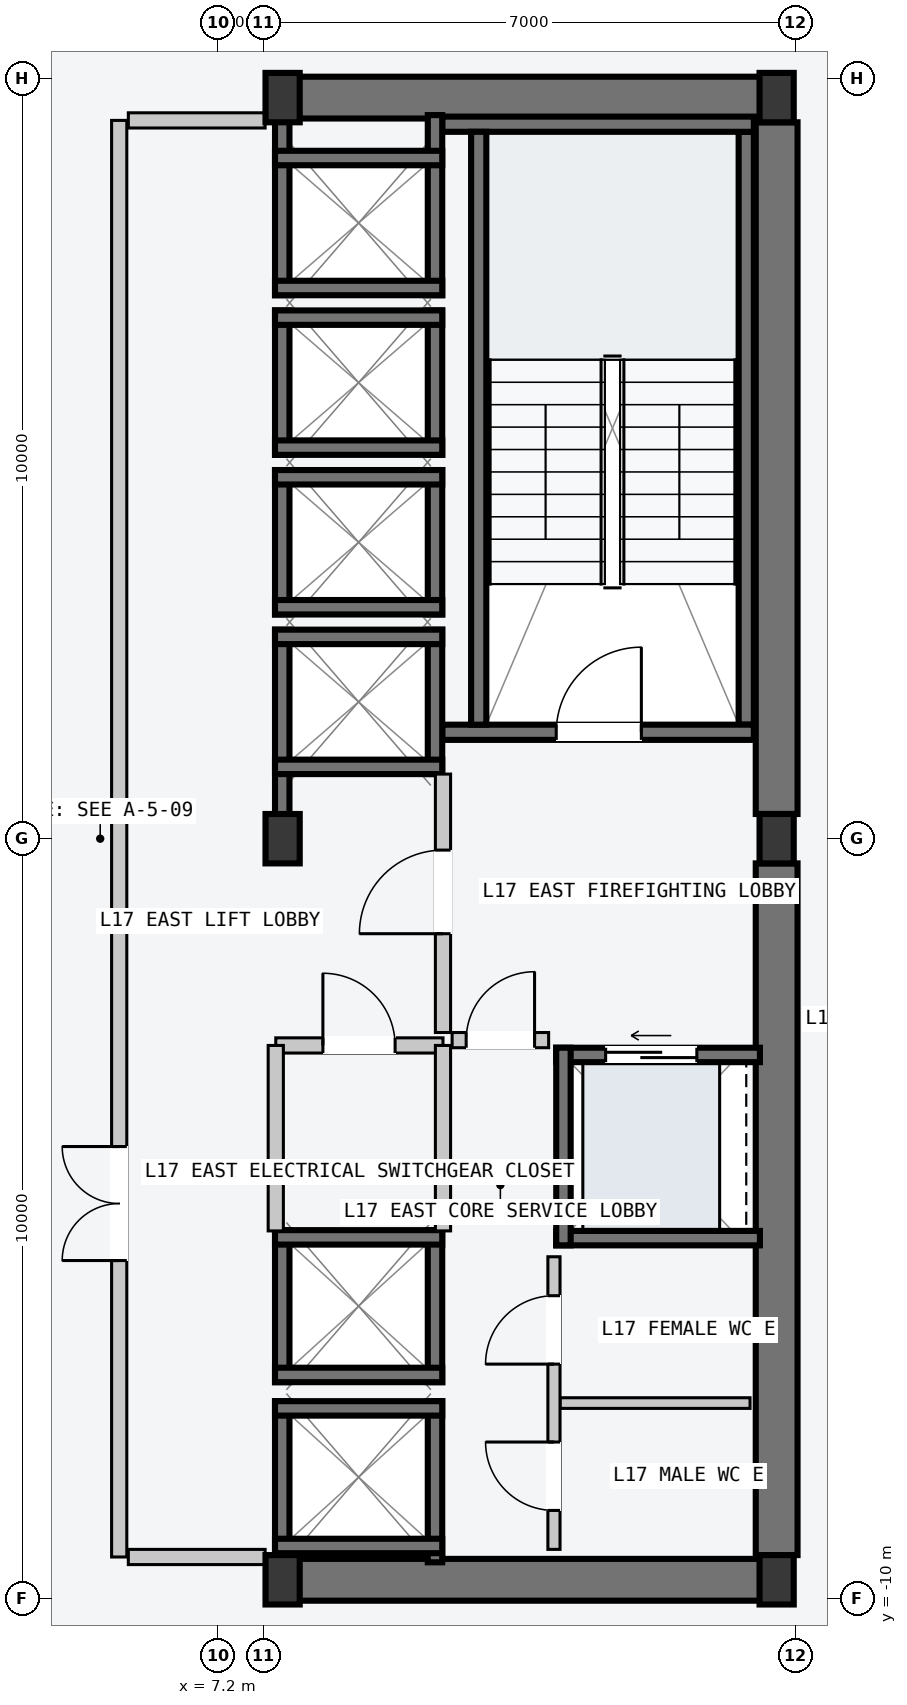
"""IFC4 building model, lengths in metres.
Left out: names, types, materials, properties, quantities, classifications, styles, units other than length and angle.
Written with IfcOpenShell. Run it as: python <this file> out.ifc"""

import sys

from ifc_helpers import new_model, si_unit, direction, frame, frame_2d, origin, origin_2d, place, context, subcontext, project, spatial, rectangle, i_section, extrude, element, fill, save


model = new_model("IFC4")
c1 = context("Model", 3, precision=1e-05, world=origin(), true_north=direction((0.0, 1.0)))
c2 = subcontext(c1, "Body", "Model", "MODEL_VIEW")
j1 = project(units=[si_unit("LENGTHUNIT", "METRE"), si_unit("PLANEANGLEUNIT", "RADIAN")], contexts=[c1])
p1 = place(None, origin())
s1 = spatial("IfcSite", under=j1, at=p1, CompositionType="ELEMENT")
p2 = place(p1, origin())
s2 = spatial("IfcBuilding", under=s1, at=p2, CompositionType="ELEMENT")
p3 = place(p2, frame((0.0, 0.0, 67.2)))
s3 = spatial("IfcBuildingStorey", under=s2, at=p3, CompositionType="ELEMENT", Elevation=67.2)
for number, where, z_axis, x_axis in (
    (1, (8.07, -9.75, -0.2), (0.0, 0.0, 1.0), (1.0, 0.0, 0.0)),
    (2, (8.07, 9.75, -0.2), (0.0, 0.0, 1.0), (1.0, 0.0, 0.0)),
):
    element("IfcWall", number, at=place(p3, frame(where, z_axis=z_axis, x_axis=x_axis)), inside=s3, PredefinedType="SHEAR", context=c2, shape_type="SweptSolid", body=[
        extrude(rectangle(XDim=6.46, YDim=0.55, at=frame_2d((3.23, 0.0))), origin(), (0.0, 0.0, 1.0), 3.6),
    ])
for number, where, z_axis, x_axis in (
    (3, (14.55, -9.425, -0.2), (0.0, 0.0, 1.0), (0.0, 1.0, 0.0)),
    (4, (14.55, 0.325, -0.2), (0.0, 0.0, 1.0), (0.0, 1.0, 0.0)),
):
    element("IfcWall", number, at=place(p3, frame(where, z_axis=z_axis, x_axis=x_axis)), inside=s3, PredefinedType="SHEAR", context=c2, shape_type="SweptSolid", body=[
        extrude(rectangle(XDim=9.1, YDim=0.55, at=frame_2d((4.55, 0.0))), origin(), (0.0, 0.0, 1.0), 3.6),
    ])
p4 = place(p3, frame((14.15, 1.5, -0.2), z_axis=(0.0, 0.0, 1.0), x_axis=(0.0, 1.0, 0.0)))
e5 = element("IfcWall", 5, at=p4, inside=s3, PredefinedType="SOLIDWALL", context=c2, shape_type="SweptSolid", body=[
    extrude(rectangle(XDim=7.8, YDim=0.2, at=frame_2d((3.9, 0.0))), origin(), (0.0, 0.0, 1.0), 3.6),
])
p5 = place(p3, frame((10.15, 1.4, -0.2), z_axis=(0.0, 0.0, 1.0), x_axis=(1.0, 0.0, 0.0)))
e6 = element("IfcWall", 6, at=p5, inside=s3, PredefinedType="SOLIDWALL", context=c2, shape_type="SweptSolid", body=[
    extrude(rectangle(XDim=4.1, YDim=0.2, at=frame_2d((2.05, 0.0))), origin(), (0.0, 0.0, 1.0), 3.6),
])
p6 = place(p5, frame((1.5, 0.0, 0.2)))
e7 = element("IfcOpeningElement", 7, at=p6, cuts=e6, PredefinedType="OPENING", context=c2, shape_type="SweptSolid", body=[
    extrude(rectangle(XDim=1.12, YDim=2.18, at=frame_2d((0.56, 1.09))), frame((0.0, 0.11, 0.0), z_axis=(0.0, -1.0, 0.0), x_axis=(1.0, 0.0, 0.0)), (0.0, 0.0, 1.0), 0.22),
])
p7 = place(p3, frame((10.15, 9.4, -0.2), z_axis=(0.0, 0.0, 1.0), x_axis=(1.0, 0.0, 0.0)))
e8 = element("IfcWall", 8, at=p7, inside=s3, PredefinedType="SOLIDWALL", context=c2, shape_type="SweptSolid", body=[
    extrude(rectangle(XDim=4.1, YDim=0.2, at=frame_2d((2.05, 0.0))), origin(), (0.0, 0.0, 1.0), 3.6),
])
p8 = place(p3, frame((10.63, 1.5, -0.2), z_axis=(0.0, 0.0, 1.0), x_axis=(0.0, 1.0, 0.0)))
e9 = element("IfcWall", 9, at=p8, inside=s3, PredefinedType="SOLIDWALL", context=c2, shape_type="SweptSolid", body=[
    extrude(rectangle(XDim=7.8, YDim=0.2, at=frame_2d((3.9, 0.0))), origin(), (0.0, 0.0, 1.0), 3.6),
])
for number, where, z_axis, x_axis in (
    (10, (8.05, -9.75, 0.0), (0.0, 0.0, 1.0), (1.0, 0.0, 0.0)),
    (11, (8.05, 0.0, 0.0), (0.0, 0.0, 1.0), (1.0, 0.0, 0.0)),
    (12, (8.05, 9.75, 0.0), (0.0, 0.0, 1.0), (1.0, 0.0, 0.0)),
    (13, (14.55, -9.75, 0.0), (0.0, 0.0, 1.0), (1.0, 0.0, 0.0)),
    (14, (14.55, 0.0, 0.0), (0.0, 0.0, 1.0), (1.0, 0.0, 0.0)),
    (15, (14.55, 9.75, 0.0), (0.0, 0.0, 1.0), (1.0, 0.0, 0.0)),
):
    element("IfcColumn", number, at=place(p3, frame(where, z_axis=z_axis, x_axis=x_axis)), inside=s3, PredefinedType="COLUMN", context=c2, shape_type="SweptSolid", body=[
        extrude(i_section(OverallWidth=0.45, OverallDepth=0.65, WebThickness=0.025, FlangeThickness=0.04, at=origin_2d()), origin(), (0.0, 0.0, 1.0), 3.6),
    ])
p9 = place(p3, frame((8.045, 0.21, -0.2), z_axis=(0.0, 0.0, 1.0), x_axis=(0.0, 1.0, 0.0)))
e16 = element("IfcWall", 16, at=p9, inside=s3, PredefinedType="SOLIDWALL", context=c2, shape_type="SweptSolid", body=[
    extrude(rectangle(XDim=2.54, YDim=0.19, at=frame_2d((1.27, 0.0))), origin(), (0.0, 0.0, 1.0), 3.6),
])
p10 = place(p3, frame((10.055, 0.85, -0.2), z_axis=(0.0, 0.0, 1.0), x_axis=(0.0, 1.0, 0.0)))
e17 = element("IfcWall", 17, at=p10, inside=s3, PredefinedType="SOLIDWALL", context=c2, shape_type="SweptSolid", body=[
    extrude(rectangle(XDim=1.9, YDim=0.19, at=frame_2d((0.95, 0.0))), origin(), (0.0, 0.0, 1.0), 3.6),
])
for number, where, z_axis, x_axis in (
    (18, (7.95, 2.655, -0.2), (0.0, 0.0, 1.0), (1.0, 0.0, 0.0)),
    (19, (7.95, 0.945, -0.2), (0.0, 0.0, 1.0), (1.0, 0.0, 0.0)),
):
    element("IfcWall", number, at=place(p3, frame(where, z_axis=z_axis, x_axis=x_axis)), inside=s3, PredefinedType="SOLIDWALL", context=c2, shape_type="SweptSolid", body=[
        extrude(rectangle(XDim=2.2, YDim=0.19, at=frame_2d((1.1, 0.0))), origin(), (0.0, 0.0, 1.0), 3.6),
    ])
for number, where, z_axis, x_axis in (
    (20, (8.045, 2.95, -0.2), (0.0, 0.0, 1.0), (0.0, 1.0, 0.0)),
    (21, (10.055, 2.95, -0.2), (0.0, 0.0, 1.0), (0.0, 1.0, 0.0)),
):
    element("IfcWall", number, at=place(p3, frame(where, z_axis=z_axis, x_axis=x_axis)), inside=s3, PredefinedType="SOLIDWALL", context=c2, shape_type="SweptSolid", body=[
        extrude(rectangle(XDim=1.9, YDim=0.19, at=frame_2d((0.95, 0.0))), origin(), (0.0, 0.0, 1.0), 3.6),
    ])
for number, where, z_axis, x_axis in (
    (22, (7.95, 4.755, -0.2), (0.0, 0.0, 1.0), (1.0, 0.0, 0.0)),
    (23, (7.95, 3.045, -0.2), (0.0, 0.0, 1.0), (1.0, 0.0, 0.0)),
):
    element("IfcWall", number, at=place(p3, frame(where, z_axis=z_axis, x_axis=x_axis)), inside=s3, PredefinedType="SOLIDWALL", context=c2, shape_type="SweptSolid", body=[
        extrude(rectangle(XDim=2.2, YDim=0.19, at=frame_2d((1.1, 0.0))), origin(), (0.0, 0.0, 1.0), 3.6),
    ])
for number, where, z_axis, x_axis in (
    (24, (8.045, 5.05, -0.2), (0.0, 0.0, 1.0), (0.0, 1.0, 0.0)),
    (25, (10.055, 5.05, -0.2), (0.0, 0.0, 1.0), (0.0, 1.0, 0.0)),
):
    element("IfcWall", number, at=place(p3, frame(where, z_axis=z_axis, x_axis=x_axis)), inside=s3, PredefinedType="SOLIDWALL", context=c2, shape_type="SweptSolid", body=[
        extrude(rectangle(XDim=1.9, YDim=0.19, at=frame_2d((0.95, 0.0))), origin(), (0.0, 0.0, 1.0), 3.6),
    ])
for number, where, z_axis, x_axis in (
    (26, (7.95, 6.855, -0.2), (0.0, 0.0, 1.0), (1.0, 0.0, 0.0)),
    (27, (7.95, 5.145, -0.2), (0.0, 0.0, 1.0), (1.0, 0.0, 0.0)),
):
    element("IfcWall", number, at=place(p3, frame(where, z_axis=z_axis, x_axis=x_axis)), inside=s3, PredefinedType="SOLIDWALL", context=c2, shape_type="SweptSolid", body=[
        extrude(rectangle(XDim=2.2, YDim=0.19, at=frame_2d((1.1, 0.0))), origin(), (0.0, 0.0, 1.0), 3.6),
    ])
for number, where, z_axis, x_axis in (
    (28, (8.045, 7.15, -0.2), (0.0, 0.0, 1.0), (0.0, 1.0, 0.0)),
    (29, (10.055, 7.15, -0.2), (0.0, 0.0, 1.0), (0.0, 1.0, 0.0)),
):
    element("IfcWall", number, at=place(p3, frame(where, z_axis=z_axis, x_axis=x_axis)), inside=s3, PredefinedType="SOLIDWALL", context=c2, shape_type="SweptSolid", body=[
        extrude(rectangle(XDim=2.37, YDim=0.19, at=frame_2d((1.185, 0.0))), origin(), (0.0, 0.0, 1.0), 3.6),
    ])
for number, where, z_axis, x_axis in (
    (30, (7.95, 8.955, -0.2), (0.0, 0.0, 1.0), (1.0, 0.0, 0.0)),
    (31, (7.95, 7.245, -0.2), (0.0, 0.0, 1.0), (1.0, 0.0, 0.0)),
):
    element("IfcWall", number, at=place(p3, frame(where, z_axis=z_axis, x_axis=x_axis)), inside=s3, PredefinedType="SOLIDWALL", context=c2, shape_type="SweptSolid", body=[
        extrude(rectangle(XDim=2.2, YDim=0.19, at=frame_2d((1.1, 0.0))), origin(), (0.0, 0.0, 1.0), 3.6),
    ])
for number, where, z_axis, x_axis in (
    (32, (8.045, -9.52, -0.2), (0.0, 0.0, 1.0), (0.0, 1.0, 0.0)),
    (33, (10.055, -9.52, -0.2), (0.0, 0.0, 1.0), (0.0, 1.0, 0.0)),
):
    element("IfcWall", number, at=place(p3, frame(where, z_axis=z_axis, x_axis=x_axis)), inside=s3, PredefinedType="SOLIDWALL", context=c2, shape_type="SweptSolid", body=[
        extrude(rectangle(XDim=2.12, YDim=0.19, at=frame_2d((1.06, 0.0))), origin(), (0.0, 0.0, 1.0), 3.6),
    ])
for number, where, z_axis, x_axis in (
    (34, (7.95, -7.495, -0.2), (0.0, 0.0, 1.0), (1.0, 0.0, 0.0)),
    (35, (7.95, -9.305, -0.2), (0.0, 0.0, 1.0), (1.0, 0.0, 0.0)),
):
    element("IfcWall", number, at=place(p3, frame(where, z_axis=z_axis, x_axis=x_axis)), inside=s3, PredefinedType="SOLIDWALL", context=c2, shape_type="SweptSolid", body=[
        extrude(rectangle(XDim=2.2, YDim=0.19, at=frame_2d((1.1, 0.0))), origin(), (0.0, 0.0, 1.0), 3.6),
    ])
for number, where, z_axis, x_axis in (
    (36, (8.045, -7.15, -0.2), (0.0, 0.0, 1.0), (0.0, 1.0, 0.0)),
    (37, (10.055, -7.15, -0.2), (0.0, 0.0, 1.0), (0.0, 1.0, 0.0)),
):
    element("IfcWall", number, at=place(p3, frame(where, z_axis=z_axis, x_axis=x_axis)), inside=s3, PredefinedType="SOLIDWALL", context=c2, shape_type="SweptSolid", body=[
        extrude(rectangle(XDim=2.0, YDim=0.19, at=frame_2d((1.0, 0.0))), origin(), (0.0, 0.0, 1.0), 3.6),
    ])
for number, where, z_axis, x_axis in (
    (38, (7.95, -5.245, -0.2), (0.0, 0.0, 1.0), (1.0, 0.0, 0.0)),
    (39, (7.95, -7.055, -0.2), (0.0, 0.0, 1.0), (1.0, 0.0, 0.0)),
):
    element("IfcWall", number, at=place(p3, frame(where, z_axis=z_axis, x_axis=x_axis)), inside=s3, PredefinedType="SOLIDWALL", context=c2, shape_type="SweptSolid", body=[
        extrude(rectangle(XDim=2.2, YDim=0.19, at=frame_2d((1.1, 0.0))), origin(), (0.0, 0.0, 1.0), 3.6),
    ])
p11 = place(p3, frame((11.65, -2.845, -0.2), z_axis=(0.0, 0.0, 1.0), x_axis=(1.0, 0.0, 0.0)))
e40 = element("IfcWall", 40, at=p11, inside=s3, PredefinedType="SOLIDWALL", context=c2, shape_type="SweptSolid", body=[
    extrude(rectangle(XDim=2.68, YDim=0.19, at=frame_2d((1.34, 0.0))), origin(), (0.0, 0.0, 1.0), 3.6),
])
p12 = place(p11, frame((0.65, 0.0, 0.2)))
e41 = element("IfcOpeningElement", 41, at=p12, cuts=e40, PredefinedType="OPENING", context=c2, shape_type="SweptSolid", body=[
    extrude(rectangle(XDim=1.2, YDim=2.2, at=frame_2d((0.6, 1.1))), frame((0.0, 0.105, 0.0), z_axis=(0.0, -1.0, 0.0), x_axis=(1.0, 0.0, 0.0)), (0.0, 0.0, 1.0), 0.21),
])
p13 = place(p3, frame((11.65, -5.255, -0.2), z_axis=(0.0, 0.0, 1.0), x_axis=(1.0, 0.0, 0.0)))
e42 = element("IfcWall", 42, at=p13, inside=s3, PredefinedType="SOLIDWALL", context=c2, shape_type="SweptSolid", body=[
    extrude(rectangle(XDim=2.68, YDim=0.19, at=frame_2d((1.34, 0.0))), origin(), (0.0, 0.0, 1.0), 3.6),
])
p14 = place(p3, frame((11.745, -5.35, -0.2), z_axis=(0.0, 0.0, 1.0), x_axis=(0.0, 1.0, 0.0)))
e43 = element("IfcWall", 43, at=p14, inside=s3, PredefinedType="SOLIDWALL", context=c2, shape_type="SweptSolid", body=[
    extrude(rectangle(XDim=2.6, YDim=0.19, at=frame_2d((1.3, 0.0))), origin(), (0.0, 0.0, 1.0), 3.6),
])
p15 = place(p3, frame((5.9, -9.45, 0.0), z_axis=(0.0, 0.0, 1.0), x_axis=(0.0, 1.0, 0.0)))
e44 = element("IfcWall", 44, at=p15, inside=s3, PredefinedType="PARTITIONING", context=c2, shape_type="SweptSolid", body=[
    extrude(rectangle(XDim=18.9, YDim=0.2, at=frame_2d((9.45, 0.0))), origin(), (0.0, 0.0, 1.0), 3.4),
])
p16 = place(p15, frame((3.9, 0.0, 0.0)))
e45 = element("IfcOpeningElement", 45, at=p16, cuts=e44, PredefinedType="OPENING", context=c2, shape_type="SweptSolid", body=[
    extrude(rectangle(XDim=1.5, YDim=2.2, at=frame_2d((0.75, 1.1))), frame((0.0, 0.11, 0.0), z_axis=(0.0, -1.0, 0.0), x_axis=(1.0, 0.0, 0.0)), (0.0, 0.0, 1.0), 0.22),
])
for number, where, z_axis, x_axis in (
    (46, (6.02, -9.45, 0.0), (0.0, 0.0, 1.0), (1.0, 0.0, 0.0)),
    (47, (6.02, 9.45, 0.0), (0.0, 0.0, 1.0), (1.0, 0.0, 0.0)),
):
    element("IfcWall", number, at=place(p3, frame(where, z_axis=z_axis, x_axis=x_axis)), inside=s3, PredefinedType="PARTITIONING", context=c2, shape_type="SweptSolid", body=[
        extrude(rectangle(XDim=1.8, YDim=0.2, at=frame_2d((0.9, 0.0))), origin(), (0.0, 0.0, 1.0), 3.4),
    ])
p17 = place(p3, frame((10.16, -2.55, 0.0), z_axis=(0.0, 0.0, 1.0), x_axis=(0.0, 1.0, 0.0)))
e48 = element("IfcWall", 48, at=p17, inside=s3, PredefinedType="PARTITIONING", context=c2, shape_type="SweptSolid", body=[
    extrude(rectangle(XDim=3.4, YDim=0.2, at=frame_2d((1.7, 0.0))), origin(), (0.0, 0.0, 1.0), 3.4),
])
p18 = place(p17, frame((1.3, 0.0, 0.0)))
e49 = element("IfcOpeningElement", 49, at=p18, cuts=e48, PredefinedType="OPENING", context=c2, shape_type="SweptSolid", body=[
    extrude(rectangle(XDim=1.1, YDim=2.15, at=frame_2d((0.55, 1.075))), frame((0.0, 0.11, 0.0), z_axis=(0.0, -1.0, 0.0), x_axis=(1.0, 0.0, 0.0)), (0.0, 0.0, 1.0), 0.22),
])
p19 = place(p3, frame((10.28, -2.65, 0.0), z_axis=(0.0, 0.0, 1.0), x_axis=(1.0, 0.0, 0.0)))
e50 = element("IfcWall", 50, at=p19, inside=s3, PredefinedType="PARTITIONING", context=c2, shape_type="SweptSolid", body=[
    extrude(rectangle(XDim=1.27, YDim=0.2, at=frame_2d((0.635, 0.0))), origin(), (0.0, 0.0, 1.0), 3.4),
])
p20 = place(p19, frame((0.185, 0.0, 0.0)))
e51 = element("IfcOpeningElement", 51, at=p20, cuts=e50, PredefinedType="OPENING", context=c2, shape_type="SweptSolid", body=[
    extrude(rectangle(XDim=0.9, YDim=2.15, at=frame_2d((0.45, 1.075))), frame((0.0, 0.11, 0.0), z_axis=(0.0, -1.0, 0.0), x_axis=(1.0, 0.0, 0.0)), (0.0, 0.0, 1.0), 0.22),
])
p21 = place(p3, frame((7.96, -2.72, 0.0), z_axis=(0.0, 0.0, 1.0), x_axis=(1.0, 0.0, 0.0)))
e52 = element("IfcWall", 52, at=p21, inside=s3, PredefinedType="PARTITIONING", context=c2, shape_type="SweptSolid", body=[
    extrude(rectangle(XDim=2.2, YDim=0.2, at=frame_2d((1.1, 0.0))), origin(), (0.0, 0.0, 1.0), 3.4),
])
p22 = place(p21, frame((0.62, 0.0, 0.0)))
e53 = element("IfcOpeningElement", 53, at=p22, cuts=e52, PredefinedType="OPENING", context=c2, shape_type="SweptSolid", body=[
    extrude(rectangle(XDim=0.95, YDim=2.1, at=frame_2d((0.475, 1.05))), frame((0.0, 0.11, 0.0), z_axis=(0.0, -1.0, 0.0), x_axis=(1.0, 0.0, 0.0)), (0.0, 0.0, 1.0), 0.22),
])
for number, where, z_axis, x_axis in (
    (54, (7.96, -5.16, 0.0), (0.0, 0.0, 1.0), (0.0, 1.0, 0.0)),
    (55, (10.16, -5.16, 0.0), (0.0, 0.0, 1.0), (0.0, 1.0, 0.0)),
):
    element("IfcWall", number, at=place(p3, frame(where, z_axis=z_axis, x_axis=x_axis)), inside=s3, PredefinedType="PARTITIONING", context=c2, shape_type="SweptSolid", body=[
        extrude(rectangle(XDim=2.44, YDim=0.2, at=frame_2d((1.22, 0.0))), origin(), (0.0, 0.0, 1.0), 3.4),
    ])
p23 = place(p3, frame((11.7, -7.425, 0.0), z_axis=(0.0, 0.0, 1.0), x_axis=(1.0, 0.0, 0.0)))
e56 = element("IfcWall", 56, at=p23, inside=s3, PredefinedType="PARTITIONING", context=c2, shape_type="SweptSolid", body=[
    extrude(rectangle(XDim=2.5, YDim=0.14, at=frame_2d((1.25, 0.0))), origin(), (0.0, 0.0, 1.0), 3.4),
])
p24 = place(p3, frame((11.62, -9.35, 0.0), z_axis=(0.0, 0.0, 1.0), x_axis=(0.0, 1.0, 0.0)))
e57 = element("IfcWall", 57, at=p24, inside=s3, PredefinedType="PARTITIONING", context=c2, shape_type="SweptSolid", body=[
    extrude(rectangle(XDim=3.85, YDim=0.16, at=frame_2d((1.925, 0.0))), origin(), (0.0, 0.0, 1.0), 3.4),
])
p25 = place(p24, frame((0.512, 0.0, 0.0)))
e58 = element("IfcOpeningElement", 58, at=p25, cuts=e57, PredefinedType="OPENING", context=c2, shape_type="SweptSolid", body=[
    extrude(rectangle(XDim=0.9, YDim=2.15, at=frame_2d((0.45, 1.075))), frame((0.0, 0.09, 0.0), z_axis=(0.0, -1.0, 0.0), x_axis=(1.0, 0.0, 0.0)), (0.0, 0.0, 1.0), 0.18),
])
p26 = place(p24, frame((2.438, 0.0, 0.0)))
e59 = element("IfcOpeningElement", 59, at=p26, cuts=e57, PredefinedType="OPENING", context=c2, shape_type="SweptSolid", body=[
    extrude(rectangle(XDim=0.9, YDim=2.15, at=frame_2d((0.45, 1.075))), frame((0.0, 0.09, 0.0), z_axis=(0.0, -1.0, 0.0), x_axis=(1.0, 0.0, 0.0)), (0.0, 0.0, 1.0), 0.18),
])
p27 = place(p6, origin())
e60 = element("IfcDoor", 60, at=p27, inside=s3, OperationType="SINGLE_SWING_RIGHT", PredefinedType="DOOR", context=c2, shape_type="SweptSolid", body=[
    extrude(rectangle(XDim=1.12, YDim=2.18, at=frame_2d((0.56, 1.09))), frame((0.0, 0.025, 0.0), z_axis=(0.0, -1.0, 0.0), x_axis=(1.0, 0.0, 0.0)), (0.0, 0.0, 1.0), 0.05),
])
fill(e7, e60)
p28 = place(p12, origin())
e61 = element("IfcDoor", 61, at=p28, inside=s3, OperationType="SLIDING_TO_LEFT", PredefinedType="DOOR", context=c2, shape_type="SweptSolid", body=[
    extrude(rectangle(XDim=1.2, YDim=2.2, at=frame_2d((0.6, 1.1))), frame((0.0, 0.025, 0.0), z_axis=(0.0, -1.0, 0.0), x_axis=(1.0, 0.0, 0.0)), (0.0, 0.0, 1.0), 0.05),
])
fill(e41, e61)
p29 = place(p16, origin())
e62 = element("IfcDoor", 62, at=p29, inside=s3, OperationType="DOUBLE_DOOR_SINGLE_SWING", PredefinedType="DOOR", context=c2, shape_type="SweptSolid", body=[
    extrude(rectangle(XDim=1.5, YDim=2.2, at=frame_2d((0.75, 1.1))), frame((0.0, 0.025, 0.0), z_axis=(0.0, -1.0, 0.0), x_axis=(1.0, 0.0, 0.0)), (0.0, 0.0, 1.0), 0.05),
])
fill(e45, e62)
p30 = place(p18, origin())
e63 = element("IfcDoor", 63, at=p30, inside=s3, OperationType="SINGLE_SWING_LEFT", PredefinedType="DOOR", context=c2, shape_type="SweptSolid", body=[
    extrude(rectangle(XDim=1.1, YDim=2.15, at=frame_2d((0.55, 1.075))), frame((0.0, 0.025, 0.0), z_axis=(0.0, -1.0, 0.0), x_axis=(1.0, 0.0, 0.0)), (0.0, 0.0, 1.0), 0.05),
])
fill(e49, e63)
p31 = place(p20, origin())
e64 = element("IfcDoor", 64, at=p31, inside=s3, OperationType="SINGLE_SWING_RIGHT", PredefinedType="DOOR", context=c2, shape_type="SweptSolid", body=[
    extrude(rectangle(XDim=0.9, YDim=2.15, at=frame_2d((0.45, 1.075))), frame((0.0, 0.025, 0.0), z_axis=(0.0, -1.0, 0.0), x_axis=(1.0, 0.0, 0.0)), (0.0, 0.0, 1.0), 0.05),
])
fill(e51, e64)
p32 = place(p22, origin())
e65 = element("IfcDoor", 65, at=p32, inside=s3, OperationType="SINGLE_SWING_LEFT", PredefinedType="DOOR", context=c2, shape_type="SweptSolid", body=[
    extrude(rectangle(XDim=0.95, YDim=2.1, at=frame_2d((0.475, 1.05))), frame((0.0, 0.025, 0.0), z_axis=(0.0, -1.0, 0.0), x_axis=(1.0, 0.0, 0.0)), (0.0, 0.0, 1.0), 0.05),
])
fill(e53, e65)
p33 = place(p25, origin())
e66 = element("IfcDoor", 66, at=p33, inside=s3, OperationType="SINGLE_SWING_RIGHT", PredefinedType="DOOR", context=c2, shape_type="SweptSolid", body=[
    extrude(rectangle(XDim=0.9, YDim=2.15, at=frame_2d((0.45, 1.075))), frame((0.0, 0.025, 0.0), z_axis=(0.0, -1.0, 0.0), x_axis=(1.0, 0.0, 0.0)), (0.0, 0.0, 1.0), 0.05),
])
fill(e58, e66)
p34 = place(p26, origin())
e67 = element("IfcDoor", 67, at=p34, inside=s3, OperationType="SINGLE_SWING_LEFT", PredefinedType="DOOR", context=c2, shape_type="SweptSolid", body=[
    extrude(rectangle(XDim=0.9, YDim=2.15, at=frame_2d((0.45, 1.075))), frame((0.0, 0.025, 0.0), z_axis=(0.0, -1.0, 0.0), x_axis=(1.0, 0.0, 0.0)), (0.0, 0.0, 1.0), 0.05),
])
fill(e59, e67)
save(model, sys.argv[1])
